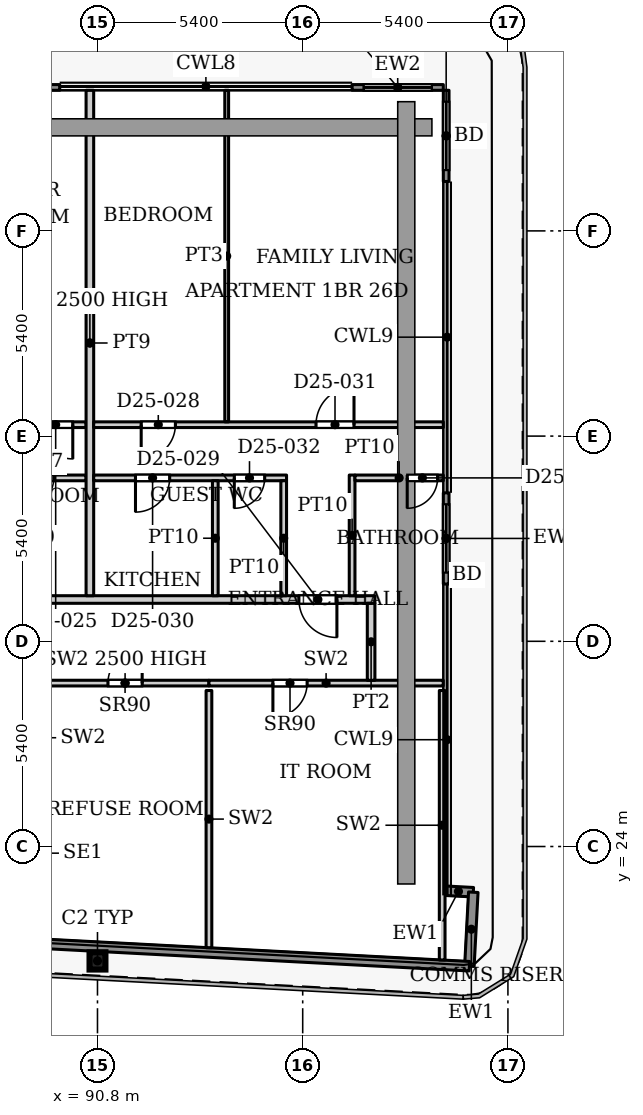
"""IFC4 building model, lengths in metres.
Left out: names, types, materials, properties, quantities, classifications, styles, units other than length and angle.
Written with IfcOpenShell. Run it as: python <this file> out.ifc"""

import sys

from ifc_helpers import new_model, si_unit, direction, frame, frame_2d, origin, origin_2d, place, context, subcontext, project, spatial, rectangle, i_section, extrude, source, transform, mapped, element, fill, save


model = new_model("IFC4")
c1 = context("Model", 3, precision=1e-05, world=origin(), true_north=direction((0.0, 1.0)))
c2 = subcontext(c1, "Body", "Model", "MODEL_VIEW")
j1 = project(units=[si_unit("LENGTHUNIT", "METRE"), si_unit("PLANEANGLEUNIT", "RADIAN")], contexts=[c1])
p1 = place(None, origin())
s1 = spatial("IfcSite", under=j1, at=p1, CompositionType="ELEMENT")
p2 = place(p1, origin())
s2 = spatial("IfcBuilding", under=s1, at=p2, CompositionType="ELEMENT")
p3 = place(p2, frame((0.0, 0.0, 113.6)))
s3 = spatial("IfcBuildingStorey", under=s2, at=p3, CompositionType="ELEMENT", Elevation=113.6)
p4 = place(p3, frame((90.8, 20.99, 0.0), z_axis=(0.0, 0.0, 1.0), x_axis=(1.0, 0.0, 0.0)))
e1 = element("IfcColumn", 1, at=p4, inside=s3, PredefinedType="COLUMN", context=c2, shape_type="SweptSolid", body=[
    extrude(i_section(OverallWidth=0.418, OverallDepth=0.455, WebThickness=0.042, FlangeThickness=0.068, FilletRadius=0.014, at=origin_2d()), origin(), (0.0, 0.0, 1.0), 3.9),
])
p5 = place(p3, frame((87.406, 43.975, 0.0), z_axis=(0.0, 0.0, 1.0), x_axis=(1.0, 0.0, 0.0)))
e2 = element("IfcWall", 2, at=p5, inside=s3, PredefinedType="SOLIDWALL", context=c2, shape_type="SweptSolid", body=[
    extrude(rectangle(XDim=2.4, YDim=0.15, at=frame_2d((1.2, 0.0))), origin(), (0.0, 0.0, 1.0), 3.75),
])
p6 = place(p5, frame((0.3, 0.0, 0.0)))
e3 = element("IfcOpeningElement", 3, at=p6, cuts=e2, PredefinedType="OPENING", context=c2, shape_type="SweptSolid", body=[
    extrude(rectangle(XDim=1.8, YDim=2.4, at=frame_2d((0.9, 1.2))), frame((0.0, 0.085, 0.0), z_axis=(0.0, -1.0, 0.0), x_axis=(1.0, 0.0, 0.0)), (0.0, 0.0, 1.0), 0.17),
])
p7 = place(p3, frame((97.5, 43.975, 0.0), z_axis=(0.0, 0.0, 1.0), x_axis=(1.0, 0.0, 0.0)))
e4 = element("IfcWall", 4, at=p7, inside=s3, PredefinedType="SOLIDWALL", context=c2, shape_type="SweptSolid", body=[
    extrude(rectangle(XDim=2.4, YDim=0.15, at=frame_2d((1.2, 0.0))), origin(), (0.0, 0.0, 1.0), 3.75),
])
p8 = place(p7, frame((0.3, 0.0, 0.0)))
e5 = element("IfcOpeningElement", 5, at=p8, cuts=e4, PredefinedType="OPENING", context=c2, shape_type="SweptSolid", body=[
    extrude(rectangle(XDim=1.8, YDim=2.4, at=frame_2d((0.9, 1.2))), frame((0.0, 0.085, 0.0), z_axis=(0.0, -1.0, 0.0), x_axis=(1.0, 0.0, 0.0)), (0.0, 0.0, 1.0), 0.17),
])
p9 = place(p3, frame((99.975, 43.9, 0.0), z_axis=(0.0, 0.0, 1.0), x_axis=(0.0, -1.0, 0.0)))
e6 = element("IfcWall", 6, at=p9, inside=s3, PredefinedType="SOLIDWALL", context=c2, shape_type="SweptSolid", body=[
    extrude(rectangle(XDim=2.4, YDim=0.15, at=frame_2d((1.2, 0.0))), origin(), (0.0, 0.0, 1.0), 3.75),
])
p10 = place(p9, frame((0.3, 0.0, 0.0)))
e7 = element("IfcOpeningElement", 7, at=p10, cuts=e6, PredefinedType="OPENING", context=c2, shape_type="SweptSolid", body=[
    extrude(rectangle(XDim=1.8, YDim=2.4, at=frame_2d((0.9, 1.2))), frame((0.0, 0.085, 0.0), z_axis=(0.0, -1.0, 0.0), x_axis=(1.0, 0.0, 0.0)), (0.0, 0.0, 1.0), 0.17),
])
p11 = place(p3, frame((99.975, 33.307, 0.0), z_axis=(0.0, 0.0, 1.0), x_axis=(0.0, -1.0, 0.0)))
e8 = element("IfcWall", 8, at=p11, inside=s3, PredefinedType="SOLIDWALL", context=c2, shape_type="SweptSolid", body=[
    extrude(rectangle(XDim=2.4, YDim=0.15, at=frame_2d((1.2, 0.0))), origin(), (0.0, 0.0, 1.0), 3.75),
])
p12 = place(p11, frame((0.3, 0.0, 0.0)))
e9 = element("IfcOpeningElement", 9, at=p12, cuts=e8, PredefinedType="OPENING", context=c2, shape_type="SweptSolid", body=[
    extrude(rectangle(XDim=1.8, YDim=2.4, at=frame_2d((0.9, 1.2))), frame((0.0, 0.085, 0.0), z_axis=(0.0, -1.0, 0.0), x_axis=(1.0, 0.0, 0.0)), (0.0, 0.0, 1.0), 0.17),
])
p13 = place(p3, frame((99.907, 22.839, 0.0), z_axis=(0.0, 0.0, 1.0), x_axis=(0.998561284263, -0.053622398031, 0.0)))
e10 = element("IfcWall", 10, at=p13, inside=s3, PredefinedType="SOLIDWALL", context=c2, shape_type="SweptSolid", body=[
    extrude(rectangle(XDim=0.783, YDim=0.25, at=frame_2d((0.392, 0.0))), origin(), (0.0, 0.0, 1.0), 3.75),
])
p14 = place(p3, frame((100.689, 22.797, 0.0), z_axis=(0.0, 0.0, 1.0), x_axis=(-0.052841433274, -0.998602915542, 0.0)))
e11 = element("IfcWall", 11, at=p14, inside=s3, PredefinedType="SOLIDWALL", context=c2, shape_type="SweptSolid", body=[
    extrude(rectangle(XDim=1.95, YDim=0.25, at=frame_2d((0.975, 0.0))), origin(), (0.0, 0.0, 1.0), 3.75),
])
p15 = place(p3, frame((100.586, 20.85, 0.0), z_axis=(0.0, 0.0, 1.0), x_axis=(-0.99861746497, 0.052565755559, 0.0)))
e12 = element("IfcWall", 12, at=p15, inside=s3, PredefinedType="SOLIDWALL", context=c2, shape_type="SweptSolid", body=[
    extrude(rectangle(XDim=66.639, YDim=0.25, at=frame_2d((33.319, 0.0))), origin(), (0.0, 0.0, 1.0), 3.75),
])
p16 = place(p3, frame((89.32, 28.3, 0.0), z_axis=(0.0, 0.0, 1.0), x_axis=(1.0, 0.0, 0.0)))
e13 = element("IfcWall", 13, at=p16, inside=s3, PredefinedType="PARTITIONING", context=c2, shape_type="SweptSolid", body=[
    extrude(rectangle(XDim=4.413, YDim=0.15, at=frame_2d((2.207, 0.0))), origin(), (0.0, 0.0, 1.0), 2.5),
])
p17 = place(p16, frame((1.756, 0.0, 0.0)))
e14 = element("IfcOpeningElement", 14, at=p17, cuts=e13, PredefinedType="OPENING", context=c2, shape_type="SweptSolid", body=[
    extrude(rectangle(XDim=0.9, YDim=2.2, at=frame_2d((0.45, 1.1))), frame((0.0, 0.085, 0.0), z_axis=(0.0, -1.0, 0.0), x_axis=(1.0, 0.0, 0.0)), (0.0, 0.0, 1.0), 0.17),
])
p18 = place(p3, frame((93.733, 21.338, 0.0), z_axis=(0.0, 0.0, 1.0), x_axis=(0.0, 1.0, 0.0)))
e15 = element("IfcWall", 15, at=p18, inside=s3, PredefinedType="PARTITIONING", context=c2, shape_type="SweptSolid", body=[
    extrude(rectangle(XDim=6.767, YDim=0.15, at=frame_2d((3.384, 0.0))), origin(), (0.0, 0.0, 1.0), 3.9),
])
p19 = place(p3, frame((93.733, 28.3, 0.0), z_axis=(0.0, 0.0, 1.0), x_axis=(1.0, 0.0, 0.0)))
e16 = element("IfcWall", 16, at=p19, inside=s3, PredefinedType="PARTITIONING", context=c2, shape_type="SweptSolid", body=[
    extrude(rectangle(XDim=6.165, YDim=0.15, at=frame_2d((3.083, 0.0))), origin(), (0.0, 0.0, 1.0), 3.9),
])
p20 = place(p19, frame((1.683, 0.0, 0.0)))
e17 = element("IfcOpeningElement", 17, at=p20, cuts=e16, PredefinedType="OPENING", context=c2, shape_type="SweptSolid", body=[
    extrude(rectangle(XDim=0.9, YDim=2.2, at=frame_2d((0.45, 1.1))), frame((0.0, 0.085, 0.0), z_axis=(0.0, -1.0, 0.0), x_axis=(1.0, 0.0, 0.0)), (0.0, 0.0, 1.0), 0.17),
])
p21 = place(p3, frame((99.87, 21.015, 0.0), z_axis=(0.0, 0.0, 1.0), x_axis=(0.0, 1.0, 0.0)))
e18 = element("IfcWall", 18, at=p21, inside=s3, PredefinedType="PARTITIONING", context=c2, shape_type="SweptSolid", body=[
    extrude(rectangle(XDim=7.09, YDim=0.15, at=frame_2d((3.545, 0.0))), origin(), (0.0, 0.0, 1.0), 3.9),
])
p22 = place(p3, frame((55.9, 30.5, 0.0), z_axis=(0.0, 0.0, 1.0), x_axis=(1.0, 0.0, 0.0)))
e19 = element("IfcWall", 19, at=p22, inside=s3, PredefinedType="PARTITIONING", context=c2, shape_type="SweptSolid", body=[
    extrude(rectangle(XDim=42.2, YDim=0.2, at=frame_2d((21.1, 0.0))), origin(), (0.0, 0.0, 1.0), 3.6),
])
p23 = place(p22, frame((9.75, 0.0, 0.0)))
e20 = element("IfcOpeningElement", 20, at=p23, cuts=e19, PredefinedType="OPENING", context=c2, shape_type="SweptSolid", body=[
    extrude(rectangle(XDim=1.0, YDim=2.1, at=frame_2d((0.5, 1.05))), frame((0.0, 0.11, 0.0), z_axis=(0.0, -1.0, 0.0), x_axis=(1.0, 0.0, 0.0)), (0.0, 0.0, 1.0), 0.22),
])
p24 = place(p22, frame((18.6, 0.0, 0.0)))
e21 = element("IfcOpeningElement", 21, at=p24, cuts=e19, PredefinedType="OPENING", context=c2, shape_type="SweptSolid", body=[
    extrude(rectangle(XDim=1.0, YDim=2.1, at=frame_2d((0.5, 1.05))), frame((0.0, 0.11, 0.0), z_axis=(0.0, -1.0, 0.0), x_axis=(1.0, 0.0, 0.0)), (0.0, 0.0, 1.0), 0.22),
])
p25 = place(p22, frame((23.4, 0.0, 0.0)))
e22 = element("IfcOpeningElement", 22, at=p25, cuts=e19, PredefinedType="OPENING", context=c2, shape_type="SweptSolid", body=[
    extrude(rectangle(XDim=1.0, YDim=2.1, at=frame_2d((0.5, 1.05))), frame((0.0, 0.11, 0.0), z_axis=(0.0, -1.0, 0.0), x_axis=(1.0, 0.0, 0.0)), (0.0, 0.0, 1.0), 0.22),
])
p26 = place(p22, frame((40.2, 0.0, 0.0)))
e23 = element("IfcOpeningElement", 23, at=p26, cuts=e19, PredefinedType="OPENING", context=c2, shape_type="SweptSolid", body=[
    extrude(rectangle(XDim=1.0, YDim=2.1, at=frame_2d((0.5, 1.05))), frame((0.0, 0.11, 0.0), z_axis=(0.0, -1.0, 0.0), x_axis=(1.0, 0.0, 0.0)), (0.0, 0.0, 1.0), 0.22),
])
p27 = place(p3, frame((76.0, 35.1, 0.0), z_axis=(0.0, 0.0, 1.0), x_axis=(1.0, 0.0, 0.0)))
e24 = element("IfcWall", 24, at=p27, inside=s3, PredefinedType="PARTITIONING", context=c2, shape_type="SweptSolid", body=[
    extrude(rectangle(XDim=14.5, YDim=0.15, at=frame_2d((7.25, 0.0))), origin(), (0.0, 0.0, 1.0), 3.6),
])
p28 = place(p27, frame((0.95, 0.0, 0.0)))
e25 = element("IfcOpeningElement", 25, at=p28, cuts=e24, PredefinedType="OPENING", context=c2, shape_type="SweptSolid", body=[
    extrude(rectangle(XDim=0.9, YDim=2.1, at=frame_2d((0.45, 1.05))), frame((0.0, 0.085, 0.0), z_axis=(0.0, -1.0, 0.0), x_axis=(1.0, 0.0, 0.0)), (0.0, 0.0, 1.0), 0.17),
])
p29 = place(p27, frame((6.65, 0.0, 0.0)))
e26 = element("IfcOpeningElement", 26, at=p29, cuts=e24, PredefinedType="OPENING", context=c2, shape_type="SweptSolid", body=[
    extrude(rectangle(XDim=0.9, YDim=2.1, at=frame_2d((0.45, 1.05))), frame((0.0, 0.085, 0.0), z_axis=(0.0, -1.0, 0.0), x_axis=(1.0, 0.0, 0.0)), (0.0, 0.0, 1.0), 0.17),
])
p30 = place(p27, frame((3.9, 0.0, 0.0)))
e27 = element("IfcOpeningElement", 27, at=p30, cuts=e24, PredefinedType="OPENING", context=c2, shape_type="SweptSolid", body=[
    extrude(rectangle(XDim=1.0, YDim=2.1, at=frame_2d((0.5, 1.05))), frame((0.0, 0.085, 0.0), z_axis=(0.0, -1.0, 0.0), x_axis=(1.0, 0.0, 0.0)), (0.0, 0.0, 1.0), 0.17),
])
p31 = place(p27, frame((9.45, 0.0, 0.0)))
e28 = element("IfcOpeningElement", 28, at=p31, cuts=e24, PredefinedType="OPENING", context=c2, shape_type="SweptSolid", body=[
    extrude(rectangle(XDim=0.9, YDim=2.1, at=frame_2d((0.45, 1.05))), frame((0.0, 0.085, 0.0), z_axis=(0.0, -1.0, 0.0), x_axis=(1.0, 0.0, 0.0)), (0.0, 0.0, 1.0), 0.17),
])
p32 = place(p27, frame((13.25, 0.0, 0.0)))
e29 = element("IfcOpeningElement", 29, at=p32, cuts=e24, PredefinedType="OPENING", context=c2, shape_type="SweptSolid", body=[
    extrude(rectangle(XDim=0.9, YDim=2.1, at=frame_2d((0.45, 1.05))), frame((0.0, 0.085, 0.0), z_axis=(0.0, -1.0, 0.0), x_axis=(1.0, 0.0, 0.0)), (0.0, 0.0, 1.0), 0.17),
])
p33 = place(p3, frame((81.525, 33.7, 0.0), z_axis=(0.0, 0.0, 1.0), x_axis=(1.0, 0.0, 0.0)))
e30 = element("IfcWall", 30, at=p33, inside=s3, PredefinedType="PARTITIONING", context=c2, shape_type="SweptSolid", body=[
    extrude(rectangle(XDim=8.975, YDim=0.15, at=frame_2d((4.488, 0.0))), origin(), (0.0, 0.0, 1.0), 3.6),
])
p34 = place(p33, frame((7.325, 0.0, 0.0)))
e31 = element("IfcOpeningElement", 31, at=p34, cuts=e30, PredefinedType="OPENING", context=c2, shape_type="SweptSolid", body=[
    extrude(rectangle(XDim=0.8, YDim=2.1, at=frame_2d((0.4, 1.05))), frame((0.0, 0.085, 0.0), z_axis=(0.0, -1.0, 0.0), x_axis=(1.0, 0.0, 0.0)), (0.0, 0.0, 1.0), 0.17),
])
p35 = place(p33, frame((3.725, 0.0, 0.0)))
e32 = element("IfcOpeningElement", 32, at=p35, cuts=e30, PredefinedType="OPENING", context=c2, shape_type="SweptSolid", body=[
    extrude(rectangle(XDim=0.9, YDim=2.1, at=frame_2d((0.45, 1.05))), frame((0.0, 0.085, 0.0), z_axis=(0.0, -1.0, 0.0), x_axis=(1.0, 0.0, 0.0)), (0.0, 0.0, 1.0), 0.17),
])
p36 = place(p33, frame((0.725, 0.0, 0.0)))
e33 = element("IfcOpeningElement", 33, at=p36, cuts=e30, PredefinedType="OPENING", context=c2, shape_type="SweptSolid", body=[
    extrude(rectangle(XDim=0.8, YDim=2.1, at=frame_2d((0.4, 1.05))), frame((0.0, 0.085, 0.0), z_axis=(0.0, -1.0, 0.0), x_axis=(1.0, 0.0, 0.0)), (0.0, 0.0, 1.0), 0.17),
])
p37 = place(p3, frame((90.6, 30.6, 0.0), z_axis=(0.0, 0.0, 1.0), x_axis=(0.0, 1.0, 0.0)))
e34 = element("IfcWall", 34, at=p37, inside=s3, PredefinedType="PARTITIONING", context=c2, shape_type="SweptSolid", body=[
    extrude(rectangle(XDim=13.3, YDim=0.2, at=frame_2d((6.65, 0.0))), origin(), (0.0, 0.0, 1.0), 2.5),
])
p38 = place(p3, frame((90.7, 33.7, 0.0), z_axis=(0.0, 0.0, 1.0), x_axis=(1.0, 0.0, 0.0)))
e35 = element("IfcWall", 35, at=p38, inside=s3, PredefinedType="PARTITIONING", context=c2, shape_type="SweptSolid", body=[
    extrude(rectangle(XDim=5.075, YDim=0.15, at=frame_2d((2.538, 0.0))), origin(), (0.0, 0.0, 1.0), 3.6),
])
p39 = place(p38, frame((1.1, 0.0, 0.0)))
e36 = element("IfcOpeningElement", 36, at=p39, cuts=e35, PredefinedType="OPENING", context=c2, shape_type="SweptSolid", body=[
    extrude(rectangle(XDim=0.9, YDim=2.1, at=frame_2d((0.45, 1.05))), frame((0.0, 0.085, 0.0), z_axis=(0.0, -1.0, 0.0), x_axis=(1.0, 0.0, 0.0)), (0.0, 0.0, 1.0), 0.17),
])
p40 = place(p38, frame((3.7, 0.0, 0.0)))
e37 = element("IfcOpeningElement", 37, at=p40, cuts=e35, PredefinedType="OPENING", context=c2, shape_type="SweptSolid", body=[
    extrude(rectangle(XDim=0.8, YDim=2.1, at=frame_2d((0.4, 1.05))), frame((0.0, 0.085, 0.0), z_axis=(0.0, -1.0, 0.0), x_axis=(1.0, 0.0, 0.0)), (0.0, 0.0, 1.0), 0.17),
])
p41 = place(p3, frame((90.7, 35.1, 0.0), z_axis=(0.0, 0.0, 1.0), x_axis=(1.0, 0.0, 0.0)))
e38 = element("IfcWall", 38, at=p41, inside=s3, PredefinedType="PARTITIONING", context=c2, shape_type="SweptSolid", body=[
    extrude(rectangle(XDim=9.2, YDim=0.15, at=frame_2d((4.6, 0.0))), origin(), (0.0, 0.0, 1.0), 3.6),
])
p42 = place(p41, frame((1.25, 0.0, 0.0)))
e39 = element("IfcOpeningElement", 39, at=p42, cuts=e38, PredefinedType="OPENING", context=c2, shape_type="SweptSolid", body=[
    extrude(rectangle(XDim=0.9, YDim=2.1, at=frame_2d((0.45, 1.05))), frame((0.0, 0.085, 0.0), z_axis=(0.0, -1.0, 0.0), x_axis=(1.0, 0.0, 0.0)), (0.0, 0.0, 1.0), 0.17),
])
p43 = place(p41, frame((5.85, 0.0, 0.0)))
e40 = element("IfcOpeningElement", 40, at=p43, cuts=e38, PredefinedType="OPENING", context=c2, shape_type="SweptSolid", body=[
    extrude(rectangle(XDim=1.0, YDim=2.1, at=frame_2d((0.5, 1.05))), frame((0.0, 0.085, 0.0), z_axis=(0.0, -1.0, 0.0), x_axis=(1.0, 0.0, 0.0)), (0.0, 0.0, 1.0), 0.17),
])
p44 = place(p3, frame((93.9, 30.6, 0.0), z_axis=(0.0, 0.0, 1.0), x_axis=(0.0, 1.0, 0.0)))
e41 = element("IfcWall", 41, at=p44, inside=s3, PredefinedType="PARTITIONING", context=c2, shape_type="SweptSolid", body=[
    extrude(rectangle(XDim=3.025, YDim=0.15, at=frame_2d((1.512, 0.0))), origin(), (0.0, 0.0, 1.0), 3.6),
])
p45 = place(p3, frame((94.2, 35.175, 0.0), z_axis=(0.0, 0.0, 1.0), x_axis=(0.0, 1.0, 0.0)))
e42 = element("IfcWall", 42, at=p45, inside=s3, PredefinedType="PARTITIONING", context=c2, shape_type="SweptSolid", body=[
    extrude(rectangle(XDim=8.725, YDim=0.1, at=frame_2d((4.362, 0.0))), origin(), (0.0, 0.0, 1.0), 3.6),
])
p46 = place(p3, frame((95.7, 30.6, 0.0), z_axis=(0.0, 0.0, 1.0), x_axis=(0.0, 1.0, 0.0)))
e43 = element("IfcWall", 43, at=p46, inside=s3, PredefinedType="PARTITIONING", context=c2, shape_type="SweptSolid", body=[
    extrude(rectangle(XDim=3.025, YDim=0.15, at=frame_2d((1.512, 0.0))), origin(), (0.0, 0.0, 1.0), 3.6),
])
p47 = place(p3, frame((97.5, 30.6, 0.0), z_axis=(0.0, 0.0, 1.0), x_axis=(0.0, 1.0, 0.0)))
e44 = element("IfcWall", 44, at=p47, inside=s3, PredefinedType="PARTITIONING", context=c2, shape_type="SweptSolid", body=[
    extrude(rectangle(XDim=3.175, YDim=0.15, at=frame_2d((1.587, 0.0))), origin(), (0.0, 0.0, 1.0), 3.6),
])
p48 = place(p3, frame((97.575, 33.7, 0.0), z_axis=(0.0, 0.0, 1.0), x_axis=(1.0, 0.0, 0.0)))
e45 = element("IfcWall", 45, at=p48, inside=s3, PredefinedType="PARTITIONING", context=c2, shape_type="SweptSolid", body=[
    extrude(rectangle(XDim=2.325, YDim=0.15, at=frame_2d((1.163, 0.0))), origin(), (0.0, 0.0, 1.0), 3.6),
])
p49 = place(p48, frame((1.375, 0.0, 0.0)))
e46 = element("IfcOpeningElement", 46, at=p49, cuts=e45, PredefinedType="OPENING", context=c2, shape_type="SweptSolid", body=[
    extrude(rectangle(XDim=0.8, YDim=2.1, at=frame_2d((0.4, 1.05))), frame((0.0, 0.085, 0.0), z_axis=(0.0, -1.0, 0.0), x_axis=(1.0, 0.0, 0.0)), (0.0, 0.0, 1.0), 0.17),
])
p50 = place(p3, frame((98.0, 28.374, 0.0), z_axis=(0.0, 0.0, 1.0), x_axis=(0.0, 1.0, 0.0)))
e47 = element("IfcWall", 47, at=p50, inside=s3, PredefinedType="PARTITIONING", context=c2, shape_type="SweptSolid", body=[
    extrude(rectangle(XDim=2.026, YDim=0.2, at=frame_2d((1.013, 0.0))), origin(), (0.0, 0.0, 1.0), 3.6),
])
m1 = source(origin(), c2, "Body", "SweptSolid", [
    extrude(rectangle(XDim=1.8, YDim=2.4, at=frame_2d((0.9, 1.2))), frame((0.0, 0.025, 0.0), z_axis=(0.0, -1.0, 0.0), x_axis=(1.0, 0.0, 0.0)), (0.0, 0.0, 1.0), 0.05),
])
p51 = place(p8, origin())
e48 = element("IfcDoor", 48, at=p51, inside=s3, OperationType="SLIDING_TO_LEFT", PredefinedType="DOOR", context=c2, shape_type="MappedRepresentation", body=[
    mapped(m1, transform((0.0, 0.0, 0.0), x_axis=(1.0, 0.0, 0.0), y_axis=(0.0, 1.0, 0.0), z_axis=(0.0, 0.0, 1.0), scale=1.0)),
])
fill(e5, e48)
p52 = place(p10, origin())
e49 = element("IfcDoor", 49, at=p52, inside=s3, OperationType="SLIDING_TO_LEFT", PredefinedType="DOOR", context=c2, shape_type="MappedRepresentation", body=[
    mapped(m1, transform((0.0, 0.0, 0.0), x_axis=(1.0, 0.0, 0.0), y_axis=(0.0, 1.0, 0.0), z_axis=(0.0, 0.0, 1.0), scale=1.0)),
])
fill(e7, e49)
p53 = place(p12, origin())
e50 = element("IfcDoor", 50, at=p53, inside=s3, OperationType="SLIDING_TO_LEFT", PredefinedType="DOOR", context=c2, shape_type="MappedRepresentation", body=[
    mapped(m1, transform((0.0, 0.0, 0.0), x_axis=(1.0, 0.0, 0.0), y_axis=(0.0, 1.0, 0.0), z_axis=(0.0, 0.0, 1.0), scale=1.0)),
])
fill(e9, e50)
m2 = source(origin(), c2, "Body", "SweptSolid", [
    extrude(rectangle(XDim=0.9, YDim=2.2, at=frame_2d((0.45, 1.1))), frame((0.0, 0.025, 0.0), z_axis=(0.0, -1.0, 0.0), x_axis=(1.0, 0.0, 0.0)), (0.0, 0.0, 1.0), 0.05),
])
p54 = place(p17, origin())
e51 = element("IfcDoor", 51, at=p54, inside=s3, OperationType="SINGLE_SWING_LEFT", PredefinedType="DOOR", context=c2, shape_type="MappedRepresentation", body=[
    mapped(m2, transform((0.0, 0.0, 0.0), x_axis=(1.0, 0.0, 0.0), y_axis=(0.0, 1.0, 0.0), z_axis=(0.0, 0.0, 1.0), scale=1.0)),
])
fill(e14, e51)
p55 = place(p20, origin())
e52 = element("IfcDoor", 52, at=p55, inside=s3, OperationType="SINGLE_SWING_RIGHT", PredefinedType="DOOR", context=c2, shape_type="MappedRepresentation", body=[
    mapped(m2, transform((0.0, 0.0, 0.0), x_axis=(1.0, 0.0, 0.0), y_axis=(0.0, 1.0, 0.0), z_axis=(0.0, 0.0, 1.0), scale=1.0)),
])
fill(e17, e52)
m3 = source(origin(), c2, "Body", "SweptSolid", [
    extrude(rectangle(XDim=0.8, YDim=2.1, at=frame_2d((0.4, 1.05))), frame((0.0, 0.025, 0.0), z_axis=(0.0, -1.0, 0.0), x_axis=(1.0, 0.0, 0.0)), (0.0, 0.0, 1.0), 0.05),
])
p56 = place(p34, origin())
e53 = element("IfcDoor", 53, at=p56, inside=s3, OperationType="SINGLE_SWING_RIGHT", PredefinedType="DOOR", context=c2, shape_type="MappedRepresentation", body=[
    mapped(m3, transform((0.0, 0.0, 0.0), x_axis=(1.0, 0.0, 0.0), y_axis=(0.0, 1.0, 0.0), z_axis=(0.0, 0.0, 1.0), scale=1.0)),
])
fill(e31, e53)
m4 = source(origin(), c2, "Body", "SweptSolid", [
    extrude(rectangle(XDim=0.9, YDim=2.1, at=frame_2d((0.45, 1.05))), frame((0.0, 0.025, 0.0), z_axis=(0.0, -1.0, 0.0), x_axis=(1.0, 0.0, 0.0)), (0.0, 0.0, 1.0), 0.05),
])
p57 = place(p32, origin())
e54 = element("IfcDoor", 54, at=p57, inside=s3, OperationType="SINGLE_SWING_RIGHT", PredefinedType="DOOR", context=c2, shape_type="MappedRepresentation", body=[
    mapped(m4, transform((0.0, 0.0, 0.0), x_axis=(1.0, 0.0, 0.0), y_axis=(0.0, 1.0, 0.0), z_axis=(0.0, 0.0, 1.0), scale=1.0)),
])
fill(e29, e54)
p58 = place(p49, origin())
e55 = element("IfcDoor", 55, at=p58, inside=s3, OperationType="SINGLE_SWING_RIGHT", PredefinedType="DOOR", context=c2, shape_type="MappedRepresentation", body=[
    mapped(m3, transform((0.0, 0.0, 0.0), x_axis=(1.0, 0.0, 0.0), y_axis=(0.0, 1.0, 0.0), z_axis=(0.0, 0.0, 1.0), scale=1.0)),
])
fill(e46, e55)
p59 = place(p42, origin())
e56 = element("IfcDoor", 56, at=p59, inside=s3, OperationType="SINGLE_SWING_RIGHT", PredefinedType="DOOR", context=c2, shape_type="MappedRepresentation", body=[
    mapped(m4, transform((0.0, 0.0, 0.0), x_axis=(1.0, 0.0, 0.0), y_axis=(0.0, 1.0, 0.0), z_axis=(0.0, 0.0, 1.0), scale=1.0)),
])
fill(e39, e56)
m5 = source(origin(), c2, "Body", "SweptSolid", [
    extrude(rectangle(XDim=1.0, YDim=2.1, at=frame_2d((0.5, 1.05))), frame((0.0, 0.025, 0.0), z_axis=(0.0, -1.0, 0.0), x_axis=(1.0, 0.0, 0.0)), (0.0, 0.0, 1.0), 0.05),
])
p60 = place(p26, origin())
e57 = element("IfcDoor", 57, at=p60, inside=s3, OperationType="SINGLE_SWING_RIGHT", PredefinedType="DOOR", context=c2, shape_type="MappedRepresentation", body=[
    mapped(m5, transform((0.0, 0.0, 0.0), x_axis=(1.0, 0.0, 0.0), y_axis=(0.0, 1.0, 0.0), z_axis=(0.0, 0.0, 1.0), scale=1.0)),
])
fill(e23, e57)
p61 = place(p39, origin())
e58 = element("IfcDoor", 58, at=p61, inside=s3, OperationType="SINGLE_SWING_RIGHT", PredefinedType="DOOR", context=c2, shape_type="MappedRepresentation", body=[
    mapped(m4, transform((0.0, 0.0, 0.0), x_axis=(1.0, 0.0, 0.0), y_axis=(0.0, 1.0, 0.0), z_axis=(0.0, 0.0, 1.0), scale=1.0)),
])
fill(e36, e58)
m6 = source(origin(), c2, "Body", "SweptSolid", [
    extrude(rectangle(XDim=1.0, YDim=2.1, at=frame_2d((0.5, 1.05))), frame((0.0, 0.025, 0.0), z_axis=(0.0, -1.0, 0.0), x_axis=(1.0, 0.0, 0.0)), (0.0, 0.0, 1.0), 0.05),
])
p62 = place(p43, origin())
e59 = element("IfcDoor", 59, at=p62, inside=s3, OperationType="SINGLE_SWING_LEFT", PredefinedType="DOOR", context=c2, shape_type="MappedRepresentation", body=[
    mapped(m6, transform((0.0, 0.0, 0.0), x_axis=(1.0, 0.0, 0.0), y_axis=(0.0, 1.0, 0.0), z_axis=(0.0, 0.0, 1.0), scale=1.0)),
])
fill(e40, e59)
p63 = place(p40, origin())
e60 = element("IfcDoor", 60, at=p63, inside=s3, OperationType="SINGLE_SWING_RIGHT", PredefinedType="DOOR", context=c2, shape_type="MappedRepresentation", body=[
    mapped(m3, transform((0.0, 0.0, 0.0), x_axis=(1.0, 0.0, 0.0), y_axis=(0.0, 1.0, 0.0), z_axis=(0.0, 0.0, 1.0), scale=1.0)),
])
fill(e37, e60)
save(model, sys.argv[1])
